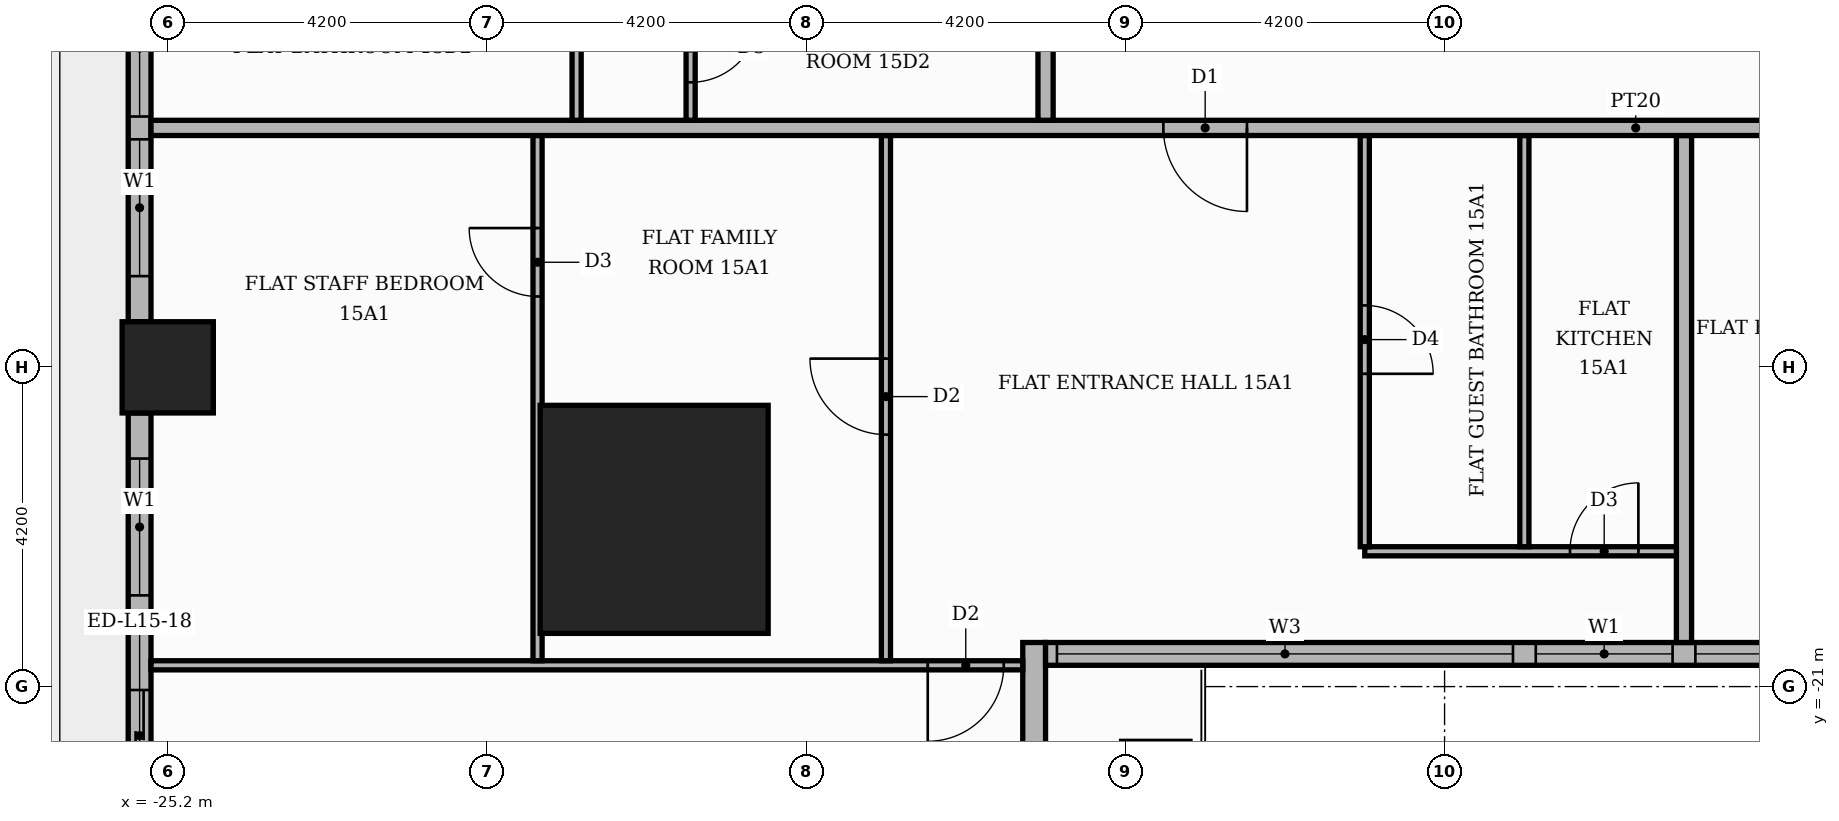
"""IFC4 building model, lengths in metres.
Left out: names, types, materials, properties, quantities, classifications, styles, units other than length and angle.
Written with IfcOpenShell. Run it as: python <this file> out.ifc"""

import sys

from ifc_helpers import new_model, si_unit, direction, frame, frame_2d, origin, origin_2d, place, context, subcontext, project, spatial, rectangle, extrude, element, fill, save


model = new_model("IFC4")
c1 = context("Model", 3, precision=1e-05, world=origin(), true_north=direction((0.0, 1.0)))
c2 = subcontext(c1, "Body", "Model", "MODEL_VIEW")
j1 = project(units=[si_unit("LENGTHUNIT", "METRE"), si_unit("PLANEANGLEUNIT", "RADIAN")], contexts=[c1])
p1 = place(None, origin())
s1 = spatial("IfcSite", under=j1, at=p1, CompositionType="ELEMENT")
p2 = place(p1, origin())
s2 = spatial("IfcBuilding", under=s1, at=p2, CompositionType="ELEMENT")
p3 = place(p2, frame((0.0, 0.0, 66.0)))
s3 = spatial("IfcBuildingStorey", under=s2, at=p3, CompositionType="ELEMENT", Elevation=66.0)
p4 = place(p3, frame((-18.8, -18.8, 0.0), z_axis=(0.0, 0.0, 1.0), x_axis=(1.0, 0.0, 0.0)))
e1 = element("IfcColumn", 1, at=p4, inside=s3, PredefinedType="COLUMN", context=c2, shape_type="SweptSolid", body=[
    extrude(rectangle(XDim=3.0, YDim=3.0, at=origin_2d()), origin(), (0.0, 0.0, 1.0), 3.9),
])
p5 = place(p3, frame((-25.2, -16.8, 0.0), z_axis=(0.0, 0.0, 1.0), x_axis=(1.0, 0.0, 0.0)))
e2 = element("IfcColumn", 2, at=p5, inside=s3, PredefinedType="COLUMN", context=c2, shape_type="SweptSolid", body=[
    extrude(rectangle(XDim=1.2, YDim=1.2, at=origin_2d()), origin(), (0.0, 0.0, 1.0), 3.9),
])
p6 = place(p3, frame((-25.57, -9.0, 0.0), z_axis=(0.0, 0.0, 1.0), x_axis=(0.0, -1.0, 0.0)))
e3 = element("IfcWall", 3, at=p6, inside=s3, PredefinedType="STANDARD", context=c2, shape_type="SweptSolid", body=[
    extrude(rectangle(XDim=7.2, YDim=0.3, at=frame_2d((3.6, 0.0))), origin(), (0.0, 0.0, 1.0), 3.48),
])
p7 = place(p6, frame((0.6, 0.0, 0.9)))
e4 = element("IfcOpeningElement", 4, at=p7, cuts=e3, PredefinedType="OPENING", context=c2, shape_type="SweptSolid", body=[
    extrude(rectangle(XDim=1.8, YDim=2.1, at=frame_2d((0.9, 1.05))), frame((0.0, 0.16, 0.0), z_axis=(0.0, -1.0, 0.0), x_axis=(1.0, 0.0, 0.0)), (0.0, 0.0, 1.0), 0.32),
])
p8 = place(p6, frame((2.7, 0.0, 0.9)))
e5 = element("IfcOpeningElement", 5, at=p8, cuts=e3, PredefinedType="OPENING", context=c2, shape_type="SweptSolid", body=[
    extrude(rectangle(XDim=1.8, YDim=2.1, at=frame_2d((0.9, 1.05))), frame((0.0, 0.16, 0.0), z_axis=(0.0, -1.0, 0.0), x_axis=(1.0, 0.0, 0.0)), (0.0, 0.0, 1.0), 0.32),
])
p9 = place(p6, frame((4.8, 0.0, 0.9)))
e6 = element("IfcOpeningElement", 6, at=p9, cuts=e3, PredefinedType="OPENING", context=c2, shape_type="SweptSolid", body=[
    extrude(rectangle(XDim=1.8, YDim=2.1, at=frame_2d((0.9, 1.05))), frame((0.0, 0.16, 0.0), z_axis=(0.0, -1.0, 0.0), x_axis=(1.0, 0.0, 0.0)), (0.0, 0.0, 1.0), 0.32),
])
p10 = place(p3, frame((-25.57, -17.4, 0.0), z_axis=(0.0, 0.0, 1.0), x_axis=(0.0, -1.0, 0.0)))
e7 = element("IfcWall", 7, at=p10, inside=s3, PredefinedType="STANDARD", context=c2, shape_type="SweptSolid", body=[
    extrude(rectangle(XDim=5.32, YDim=0.3, at=frame_2d((2.66, 0.0))), origin(), (0.0, 0.0, 1.0), 3.48),
])
p11 = place(p10, frame((0.6, 0.0, 0.9)))
e8 = element("IfcOpeningElement", 8, at=p11, cuts=e7, PredefinedType="OPENING", context=c2, shape_type="SweptSolid", body=[
    extrude(rectangle(XDim=1.8, YDim=2.1, at=frame_2d((0.9, 1.05))), frame((0.0, 0.16, 0.0), z_axis=(0.0, -1.0, 0.0), x_axis=(1.0, 0.0, 0.0)), (0.0, 0.0, 1.0), 0.32),
])
p12 = place(p10, frame((3.645, 0.0, 0.0)))
e9 = element("IfcOpeningElement", 9, at=p12, cuts=e7, PredefinedType="OPENING", context=c2, shape_type="SweptSolid", body=[
    extrude(rectangle(XDim=1.2, YDim=2.4, at=frame_2d((0.6, 1.2))), frame((0.0, 0.16, 0.0), z_axis=(0.0, -1.0, 0.0), x_axis=(1.0, 0.0, 0.0)), (0.0, 0.0, 1.0), 0.32),
])
p13 = place(p3, frame((-13.8, -25.42, 0.0), z_axis=(0.0, 0.0, 1.0), x_axis=(0.0, 1.0, 0.0)))
e10 = element("IfcWall", 10, at=p13, inside=s3, PredefinedType="STANDARD", context=c2, shape_type="SweptSolid", body=[
    extrude(rectangle(XDim=5.0, YDim=0.3, at=frame_2d((2.5, 0.0))), origin(), (0.0, 0.0, 1.0), 3.48),
])
p14 = place(p13, frame((1.42, 0.0, 0.0)))
e11 = element("IfcOpeningElement", 11, at=p14, cuts=e10, PredefinedType="OPENING", context=c2, shape_type="SweptSolid", body=[
    extrude(rectangle(XDim=1.8, YDim=2.4, at=frame_2d((0.9, 1.2))), frame((0.0, 0.16, 0.0), z_axis=(0.0, -1.0, 0.0), x_axis=(1.0, 0.0, 0.0)), (0.0, 0.0, 1.0), 0.32),
])
p15 = place(p3, frame((-13.65, -20.57, 0.0), z_axis=(0.0, 0.0, 1.0), x_axis=(1.0, 0.0, 0.0)))
e12 = element("IfcWall", 12, at=p15, inside=s3, PredefinedType="STANDARD", context=c2, shape_type="SweptSolid", body=[
    extrude(rectangle(XDim=27.6, YDim=0.3, at=frame_2d((13.8, 0.0))), origin(), (0.0, 0.0, 1.0), 3.48),
])
p16 = place(p15, frame((0.15, 0.0, 0.9)))
e13 = element("IfcOpeningElement", 13, at=p16, cuts=e12, PredefinedType="OPENING", context=c2, shape_type="SweptSolid", body=[
    extrude(rectangle(XDim=6.0, YDim=2.1, at=frame_2d((3.0, 1.05))), frame((0.0, 0.16, 0.0), z_axis=(0.0, -1.0, 0.0), x_axis=(1.0, 0.0, 0.0)), (0.0, 0.0, 1.0), 0.32),
])
p17 = place(p15, frame((6.45, 0.0, 0.9)))
e14 = element("IfcOpeningElement", 14, at=p17, cuts=e12, PredefinedType="OPENING", context=c2, shape_type="SweptSolid", body=[
    extrude(rectangle(XDim=1.8, YDim=2.1, at=frame_2d((0.9, 1.05))), frame((0.0, 0.16, 0.0), z_axis=(0.0, -1.0, 0.0), x_axis=(1.0, 0.0, 0.0)), (0.0, 0.0, 1.0), 0.32),
])
p18 = place(p15, frame((8.55, 0.0, 0.9)))
e15 = element("IfcOpeningElement", 15, at=p18, cuts=e12, PredefinedType="OPENING", context=c2, shape_type="SweptSolid", body=[
    extrude(rectangle(XDim=6.0, YDim=2.1, at=frame_2d((3.0, 1.05))), frame((0.0, 0.16, 0.0), z_axis=(0.0, -1.0, 0.0), x_axis=(1.0, 0.0, 0.0)), (0.0, 0.0, 1.0), 0.32),
])
p19 = place(p15, frame((14.85, 0.0, 0.9)))
e16 = element("IfcOpeningElement", 16, at=p19, cuts=e12, PredefinedType="OPENING", context=c2, shape_type="SweptSolid", body=[
    extrude(rectangle(XDim=6.0, YDim=2.1, at=frame_2d((3.0, 1.05))), frame((0.0, 0.16, 0.0), z_axis=(0.0, -1.0, 0.0), x_axis=(1.0, 0.0, 0.0)), (0.0, 0.0, 1.0), 0.32),
])
p20 = place(p15, frame((21.15, 0.0, 0.9)))
e17 = element("IfcOpeningElement", 17, at=p20, cuts=e12, PredefinedType="OPENING", context=c2, shape_type="SweptSolid", body=[
    extrude(rectangle(XDim=6.0, YDim=2.1, at=frame_2d((3.0, 1.05))), frame((0.0, 0.16, 0.0), z_axis=(0.0, -1.0, 0.0), x_axis=(1.0, 0.0, 0.0)), (0.0, 0.0, 1.0), 0.32),
])
p21 = place(p3, frame((-25.42, -20.72, 0.0), z_axis=(0.0, 0.0, 1.0), x_axis=(1.0, 0.0, 0.0)))
e18 = element("IfcWall", 18, at=p21, inside=s3, PredefinedType="PARTITIONING", context=c2, shape_type="SweptSolid", body=[
    extrude(rectangle(XDim=11.47, YDim=0.12, at=frame_2d((5.735, 0.0))), origin(), (0.0, 0.0, 1.0), 3.48),
])
p22 = place(p21, frame((10.22, 0.0, 0.0)))
e19 = element("IfcOpeningElement", 19, at=p22, cuts=e18, PredefinedType="OPENING", context=c2, shape_type="SweptSolid", body=[
    extrude(rectangle(XDim=1.0, YDim=2.1, at=frame_2d((0.5, 1.05))), frame((0.0, 0.07, 0.0), z_axis=(0.0, -1.0, 0.0), x_axis=(1.0, 0.0, 0.0)), (0.0, 0.0, 1.0), 0.14),
])
p23 = place(p3, frame((-5.25, -20.42, 0.0), z_axis=(0.0, 0.0, 1.0), x_axis=(0.0, 1.0, 0.0)))
e20 = element("IfcWall", 20, at=p23, inside=s3, PredefinedType="PARTITIONING", context=c2, shape_type="SweptSolid", body=[
    extrude(rectangle(XDim=6.67, YDim=0.2, at=frame_2d((3.335, 0.0))), origin(), (0.0, 0.0, 1.0), 3.48),
])
p24 = place(p3, frame((-20.334, -20.66, 0.0), z_axis=(0.0, 0.0, 1.0), x_axis=(0.0, 1.0, 0.0)))
e21 = element("IfcWall", 21, at=p24, inside=s3, PredefinedType="PARTITIONING", context=c2, shape_type="SweptSolid", body=[
    extrude(rectangle(XDim=6.91, YDim=0.12, at=frame_2d((3.455, 0.0))), origin(), (0.0, 0.0, 1.0), 3.48),
])
p25 = place(p24, frame((4.792, 0.0, 0.0)))
e22 = element("IfcOpeningElement", 22, at=p25, cuts=e21, PredefinedType="OPENING", context=c2, shape_type="SweptSolid", body=[
    extrude(rectangle(XDim=0.9, YDim=2.1, at=frame_2d((0.45, 1.05))), frame((0.0, 0.07, 0.0), z_axis=(0.0, -1.0, 0.0), x_axis=(1.0, 0.0, 0.0)), (0.0, 0.0, 1.0), 0.14),
])
p26 = place(p3, frame((-15.75, -20.66, 0.0), z_axis=(0.0, 0.0, 1.0), x_axis=(0.0, 1.0, 0.0)))
e23 = element("IfcWall", 23, at=p26, inside=s3, PredefinedType="PARTITIONING", context=c2, shape_type="SweptSolid", body=[
    extrude(rectangle(XDim=6.91, YDim=0.12, at=frame_2d((3.455, 0.0))), origin(), (0.0, 0.0, 1.0), 3.48),
])
p27 = place(p26, frame((2.975, 0.0, 0.0)))
e24 = element("IfcOpeningElement", 24, at=p27, cuts=e23, PredefinedType="OPENING", context=c2, shape_type="SweptSolid", body=[
    extrude(rectangle(XDim=1.0, YDim=2.1, at=frame_2d((0.5, 1.05))), frame((0.0, 0.07, 0.0), z_axis=(0.0, -1.0, 0.0), x_axis=(1.0, 0.0, 0.0)), (0.0, 0.0, 1.0), 0.14),
])
p28 = place(p3, frame((-9.45, -19.22, 0.0), z_axis=(0.0, 0.0, 1.0), x_axis=(1.0, 0.0, 0.0)))
e25 = element("IfcWall", 25, at=p28, inside=s3, PredefinedType="PARTITIONING", context=c2, shape_type="SweptSolid", body=[
    extrude(rectangle(XDim=4.1, YDim=0.12, at=frame_2d((2.05, 0.0))), origin(), (0.0, 0.0, 1.0), 3.48),
])
p29 = place(p28, frame((2.7, 0.0, 0.0)))
e26 = element("IfcOpeningElement", 26, at=p29, cuts=e25, PredefinedType="OPENING", context=c2, shape_type="SweptSolid", body=[
    extrude(rectangle(XDim=0.9, YDim=2.1, at=frame_2d((0.45, 1.05))), frame((0.0, 0.07, 0.0), z_axis=(0.0, -1.0, 0.0), x_axis=(1.0, 0.0, 0.0)), (0.0, 0.0, 1.0), 0.14),
])
p30 = place(p3, frame((-9.45, -19.16, 0.0), z_axis=(0.0, 0.0, 1.0), x_axis=(0.0, 1.0, 0.0)))
e27 = element("IfcWall", 27, at=p30, inside=s3, PredefinedType="PARTITIONING", context=c2, shape_type="SweptSolid", body=[
    extrude(rectangle(XDim=5.41, YDim=0.12, at=frame_2d((2.705, 0.0))), origin(), (0.0, 0.0, 1.0), 3.48),
])
p31 = place(p30, frame((2.275, 0.0, 0.0)))
e28 = element("IfcOpeningElement", 28, at=p31, cuts=e27, PredefinedType="OPENING", context=c2, shape_type="SweptSolid", body=[
    extrude(rectangle(XDim=0.9, YDim=2.1, at=frame_2d((0.45, 1.05))), frame((0.0, 0.07, 0.0), z_axis=(0.0, -1.0, 0.0), x_axis=(1.0, 0.0, 0.0)), (0.0, 0.0, 1.0), 0.14),
])
p32 = place(p3, frame((-7.35, -19.16, 0.0), z_axis=(0.0, 0.0, 1.0), x_axis=(0.0, 1.0, 0.0)))
e29 = element("IfcWall", 29, at=p32, inside=s3, PredefinedType="PARTITIONING", context=c2, shape_type="SweptSolid", body=[
    extrude(rectangle(XDim=5.41, YDim=0.12, at=frame_2d((2.705, 0.0))), origin(), (0.0, 0.0, 1.0), 3.48),
])
p33 = place(p3, frame((-25.42, -13.65, 0.0), z_axis=(0.0, 0.0, 1.0), x_axis=(1.0, 0.0, 0.0)))
e30 = element("IfcWall", 30, at=p33, inside=s3, PredefinedType="PARTITIONING", context=c2, shape_type="SweptSolid", body=[
    extrude(rectangle(XDim=39.07, YDim=0.2, at=frame_2d((19.535, 0.0))), origin(), (0.0, 0.0, 1.0), 3.48),
])
p34 = place(p33, frame((13.32, 0.0, 0.0)))
e31 = element("IfcOpeningElement", 31, at=p34, cuts=e30, PredefinedType="OPENING", context=c2, shape_type="SweptSolid", body=[
    extrude(rectangle(XDim=1.1, YDim=2.4, at=frame_2d((0.55, 1.2))), frame((0.0, 0.11, 0.0), z_axis=(0.0, -1.0, 0.0), x_axis=(1.0, 0.0, 0.0)), (0.0, 0.0, 1.0), 0.22),
])
p35 = place(p33, frame((21.72, 0.0, 0.0)))
e32 = element("IfcOpeningElement", 32, at=p35, cuts=e30, PredefinedType="OPENING", context=c2, shape_type="SweptSolid", body=[
    extrude(rectangle(XDim=1.1, YDim=2.4, at=frame_2d((0.55, 1.2))), frame((0.0, 0.11, 0.0), z_axis=(0.0, -1.0, 0.0), x_axis=(1.0, 0.0, 0.0)), (0.0, 0.0, 1.0), 0.22),
])
p36 = place(p3, frame((-19.82, -13.55, 0.0), z_axis=(0.0, 0.0, 1.0), x_axis=(0.0, 1.0, 0.0)))
e33 = element("IfcWall", 33, at=p36, inside=s3, PredefinedType="PARTITIONING", context=c2, shape_type="SweptSolid", body=[
    extrude(rectangle(XDim=1.94, YDim=0.12, at=frame_2d((0.97, 0.0))), origin(), (0.0, 0.0, 1.0), 3.48),
])
p37 = place(p3, frame((-18.32, -13.55, 0.0), z_axis=(0.0, 0.0, 1.0), x_axis=(0.0, 1.0, 0.0)))
e34 = element("IfcWall", 34, at=p37, inside=s3, PredefinedType="PARTITIONING", context=c2, shape_type="SweptSolid", body=[
    extrude(rectangle(XDim=1.94, YDim=0.12, at=frame_2d((0.97, 0.0))), origin(), (0.0, 0.0, 1.0), 3.48),
])
p38 = place(p37, frame((0.5, 0.0, 0.0)))
e35 = element("IfcOpeningElement", 35, at=p38, cuts=e34, PredefinedType="OPENING", context=c2, shape_type="SweptSolid", body=[
    extrude(rectangle(XDim=0.9, YDim=2.1, at=frame_2d((0.45, 1.05))), frame((0.0, 0.07, 0.0), z_axis=(0.0, -1.0, 0.0), x_axis=(1.0, 0.0, 0.0)), (0.0, 0.0, 1.0), 0.14),
])
p39 = place(p3, frame((-13.65, -13.55, 0.0), z_axis=(0.0, 0.0, 1.0), x_axis=(0.0, 1.0, 0.0)))
e36 = element("IfcWall", 36, at=p39, inside=s3, PredefinedType="PARTITIONING", context=c2, shape_type="SweptSolid", body=[
    extrude(rectangle(XDim=18.7, YDim=0.2, at=frame_2d((9.35, 0.0))), origin(), (0.0, 0.0, 1.0), 3.48),
])
p40 = place(p39, frame((11.95, 0.0, 0.0)))
e37 = element("IfcOpeningElement", 37, at=p40, cuts=e36, PredefinedType="OPENING", context=c2, shape_type="SweptSolid", body=[
    extrude(rectangle(XDim=1.1, YDim=2.4, at=frame_2d((0.55, 1.2))), frame((0.0, 0.11, 0.0), z_axis=(0.0, -1.0, 0.0), x_axis=(1.0, 0.0, 0.0)), (0.0, 0.0, 1.0), 0.22),
])
p41 = place(p8, origin())
e38 = element("IfcWindow", 38, at=p41, inside=s3, PartitioningType="SINGLE_PANEL", PredefinedType="WINDOW", context=c2, shape_type="SweptSolid", body=[
    extrude(rectangle(XDim=1.8, YDim=2.1, at=frame_2d((0.9, 1.05))), frame((0.0, 0.03, 0.0), z_axis=(0.0, -1.0, 0.0), x_axis=(1.0, 0.0, 0.0)), (0.0, 0.0, 1.0), 0.06),
])
fill(e5, e38)
p42 = place(p9, origin())
e39 = element("IfcWindow", 39, at=p42, inside=s3, PartitioningType="SINGLE_PANEL", PredefinedType="WINDOW", context=c2, shape_type="SweptSolid", body=[
    extrude(rectangle(XDim=1.8, YDim=2.1, at=frame_2d((0.9, 1.05))), frame((0.0, 0.03, 0.0), z_axis=(0.0, -1.0, 0.0), x_axis=(1.0, 0.0, 0.0)), (0.0, 0.0, 1.0), 0.06),
])
fill(e6, e39)
p43 = place(p11, origin())
e40 = element("IfcWindow", 40, at=p43, inside=s3, PartitioningType="SINGLE_PANEL", PredefinedType="WINDOW", context=c2, shape_type="SweptSolid", body=[
    extrude(rectangle(XDim=1.8, YDim=2.1, at=frame_2d((0.9, 1.05))), frame((0.0, 0.03, 0.0), z_axis=(0.0, -1.0, 0.0), x_axis=(1.0, 0.0, 0.0)), (0.0, 0.0, 1.0), 0.06),
])
fill(e8, e40)
p44 = place(p12, origin())
e41 = element("IfcDoor", 41, at=p44, inside=s3, OperationType="SLIDING_TO_RIGHT", PredefinedType="DOOR", context=c2, shape_type="SweptSolid", body=[
    extrude(rectangle(XDim=1.2, YDim=2.4, at=frame_2d((0.6, 1.2))), frame((0.0, 0.025, 0.0), z_axis=(0.0, -1.0, 0.0), x_axis=(1.0, 0.0, 0.0)), (0.0, 0.0, 1.0), 0.05),
])
fill(e9, e41)
p45 = place(p16, origin())
e42 = element("IfcWindow", 42, at=p45, inside=s3, PartitioningType="SINGLE_PANEL", PredefinedType="WINDOW", context=c2, shape_type="SweptSolid", body=[
    extrude(rectangle(XDim=6.0, YDim=2.1, at=frame_2d((3.0, 1.05))), frame((0.0, 0.03, 0.0), z_axis=(0.0, -1.0, 0.0), x_axis=(1.0, 0.0, 0.0)), (0.0, 0.0, 1.0), 0.06),
])
fill(e13, e42)
p46 = place(p17, origin())
e43 = element("IfcWindow", 43, at=p46, inside=s3, PartitioningType="SINGLE_PANEL", PredefinedType="WINDOW", context=c2, shape_type="SweptSolid", body=[
    extrude(rectangle(XDim=1.8, YDim=2.1, at=frame_2d((0.9, 1.05))), frame((0.0, 0.03, 0.0), z_axis=(0.0, -1.0, 0.0), x_axis=(1.0, 0.0, 0.0)), (0.0, 0.0, 1.0), 0.06),
])
fill(e14, e43)
p47 = place(p18, origin())
e44 = element("IfcWindow", 44, at=p47, inside=s3, PartitioningType="SINGLE_PANEL", PredefinedType="WINDOW", context=c2, shape_type="SweptSolid", body=[
    extrude(rectangle(XDim=6.0, YDim=2.1, at=frame_2d((3.0, 1.05))), frame((0.0, 0.03, 0.0), z_axis=(0.0, -1.0, 0.0), x_axis=(1.0, 0.0, 0.0)), (0.0, 0.0, 1.0), 0.06),
])
fill(e15, e44)
p48 = place(p34, frame((1.1, 0.0, 0.0), z_axis=(0.0, 0.0, 1.0), x_axis=(-1.0, 0.0, 0.0)))
e45 = element("IfcDoor", 45, at=p48, inside=s3, OperationType="SINGLE_SWING_RIGHT", PredefinedType="DOOR", context=c2, shape_type="SweptSolid", body=[
    extrude(rectangle(XDim=1.1, YDim=2.4, at=frame_2d((0.55, 1.2))), frame((0.0, 0.025, 0.0), z_axis=(0.0, -1.0, 0.0), x_axis=(1.0, 0.0, 0.0)), (0.0, 0.0, 1.0), 0.05),
])
fill(e31, e45)
p49 = place(p25, origin())
e46 = element("IfcDoor", 46, at=p49, inside=s3, OperationType="SINGLE_SWING_RIGHT", PredefinedType="DOOR", context=c2, shape_type="SweptSolid", body=[
    extrude(rectangle(XDim=0.9, YDim=2.1, at=frame_2d((0.45, 1.05))), frame((0.0, 0.025, 0.0), z_axis=(0.0, -1.0, 0.0), x_axis=(1.0, 0.0, 0.0)), (0.0, 0.0, 1.0), 0.05),
])
fill(e22, e46)
p50 = place(p27, origin())
e47 = element("IfcDoor", 47, at=p50, inside=s3, OperationType="SINGLE_SWING_RIGHT", PredefinedType="DOOR", context=c2, shape_type="SweptSolid", body=[
    extrude(rectangle(XDim=1.0, YDim=2.1, at=frame_2d((0.5, 1.05))), frame((0.0, 0.025, 0.0), z_axis=(0.0, -1.0, 0.0), x_axis=(1.0, 0.0, 0.0)), (0.0, 0.0, 1.0), 0.05),
])
fill(e24, e47)
p51 = place(p31, frame((0.9, 0.0, 0.0), z_axis=(0.0, 0.0, 1.0), x_axis=(-1.0, 0.0, 0.0)))
e48 = element("IfcDoor", 48, at=p51, inside=s3, OperationType="SINGLE_SWING_LEFT", PredefinedType="DOOR", context=c2, shape_type="SweptSolid", body=[
    extrude(rectangle(XDim=0.9, YDim=2.1, at=frame_2d((0.45, 1.05))), frame((0.0, 0.025, 0.0), z_axis=(0.0, -1.0, 0.0), x_axis=(1.0, 0.0, 0.0)), (0.0, 0.0, 1.0), 0.05),
])
fill(e28, e48)
p52 = place(p29, origin())
e49 = element("IfcDoor", 49, at=p52, inside=s3, OperationType="SINGLE_SWING_RIGHT", PredefinedType="DOOR", context=c2, shape_type="SweptSolid", body=[
    extrude(rectangle(XDim=0.9, YDim=2.1, at=frame_2d((0.45, 1.05))), frame((0.0, 0.025, 0.0), z_axis=(0.0, -1.0, 0.0), x_axis=(1.0, 0.0, 0.0)), (0.0, 0.0, 1.0), 0.05),
])
fill(e26, e49)
p53 = place(p22, frame((1.0, 0.0, 0.0), z_axis=(0.0, 0.0, 1.0), x_axis=(-1.0, 0.0, 0.0)))
e50 = element("IfcDoor", 50, at=p53, inside=s3, OperationType="SINGLE_SWING_LEFT", PredefinedType="DOOR", context=c2, shape_type="SweptSolid", body=[
    extrude(rectangle(XDim=1.0, YDim=2.1, at=frame_2d((0.5, 1.05))), frame((0.0, 0.025, 0.0), z_axis=(0.0, -1.0, 0.0), x_axis=(1.0, 0.0, 0.0)), (0.0, 0.0, 1.0), 0.05),
])
fill(e19, e50)
p54 = place(p38, frame((0.9, 0.0, 0.0), z_axis=(0.0, 0.0, 1.0), x_axis=(-1.0, 0.0, 0.0)))
e51 = element("IfcDoor", 51, at=p54, inside=s3, OperationType="SINGLE_SWING_RIGHT", PredefinedType="DOOR", context=c2, shape_type="SweptSolid", body=[
    extrude(rectangle(XDim=0.9, YDim=2.1, at=frame_2d((0.45, 1.05))), frame((0.0, 0.025, 0.0), z_axis=(0.0, -1.0, 0.0), x_axis=(1.0, 0.0, 0.0)), (0.0, 0.0, 1.0), 0.05),
])
fill(e35, e51)
save(model, sys.argv[1])
